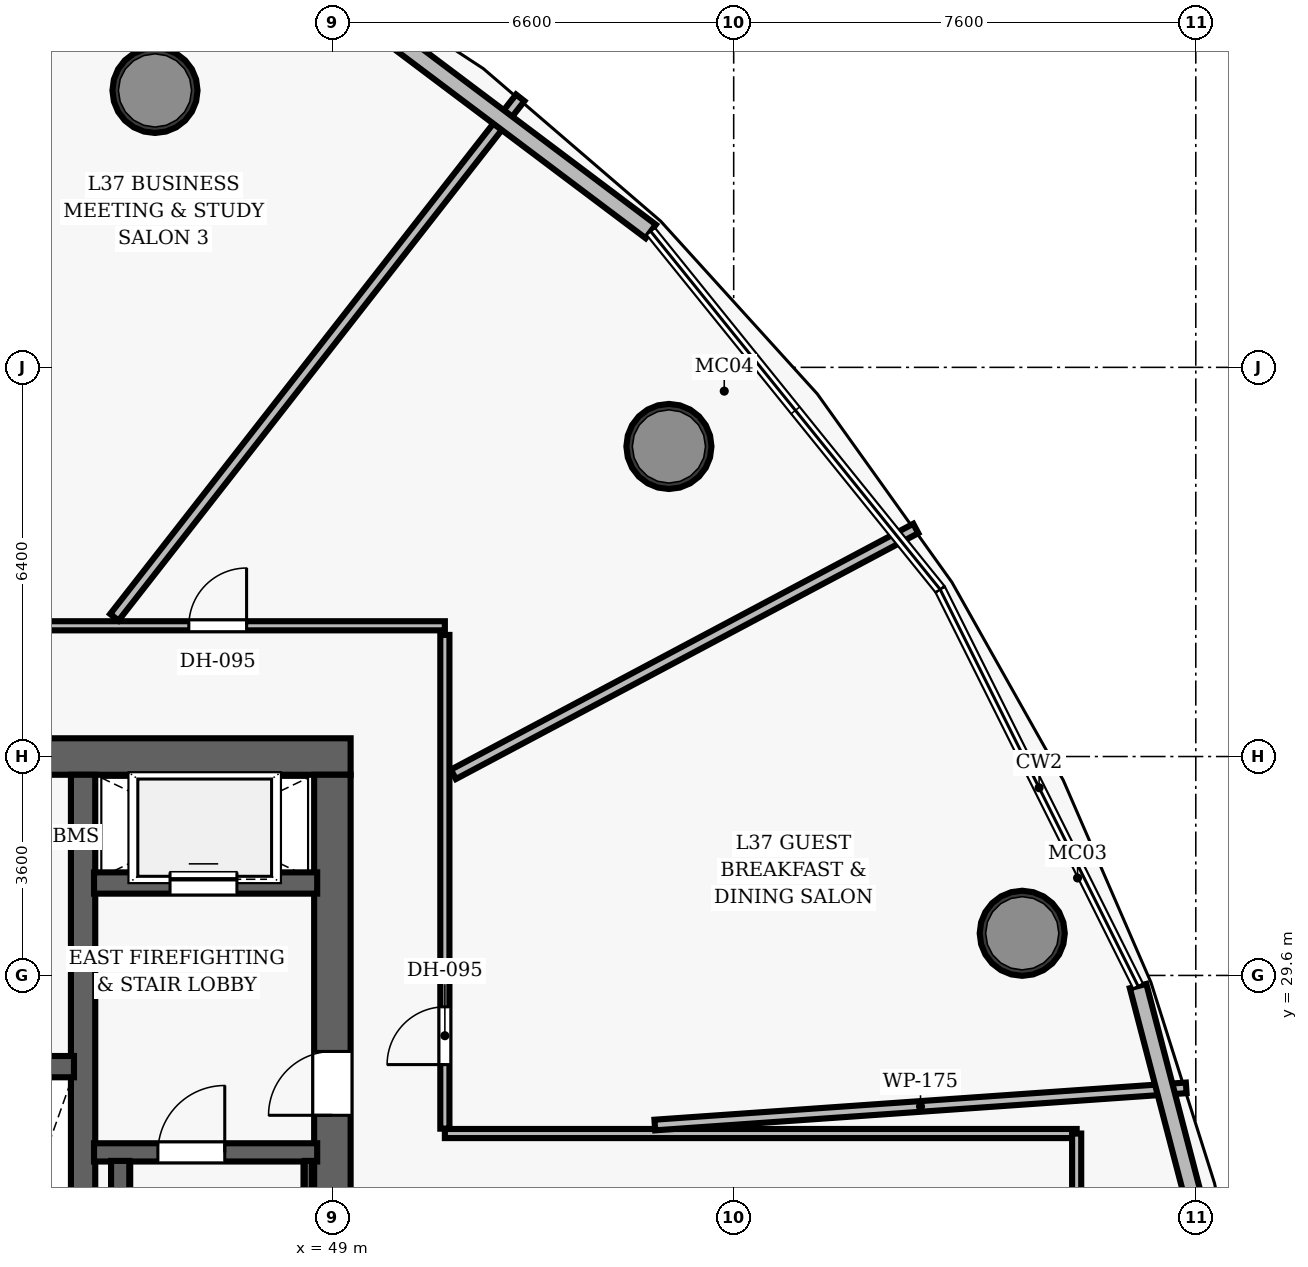
"""IFC4 building model, lengths in metres.
Left out: names, types, materials, properties, quantities, classifications, styles, units other than length and angle.
Written with IfcOpenShell. Run it as: python <this file> out.ifc"""

import sys

from ifc_helpers import new_model, si_unit, direction, frame, frame_2d, origin, origin_2d, place, context, subcontext, project, spatial, rectangle, hollow_circle, extrude, element, fill, save


model = new_model("IFC4")
c1 = context("Model", 3, precision=1e-05, world=origin(), true_north=direction((0.0, 1.0)))
c2 = subcontext(c1, "Body", "Model", "MODEL_VIEW")
j1 = project(units=[si_unit("LENGTHUNIT", "METRE"), si_unit("PLANEANGLEUNIT", "RADIAN")], contexts=[c1])
p1 = place(None, origin())
s1 = spatial("IfcSite", under=j1, at=p1, CompositionType="ELEMENT")
p2 = place(p1, origin())
s2 = spatial("IfcBuilding", under=s1, at=p2, CompositionType="ELEMENT")
p3 = place(p2, frame((0.0, 0.0, 148.3)))
s3 = spatial("IfcBuildingStorey", under=s2, at=p3, CompositionType="ELEMENT", Elevation=148.3)
p4 = place(p3, frame((26.7, 33.2, 0.0), z_axis=(0.0, 0.0, 1.0), x_axis=(1.0, 0.0, 0.0)))
e1 = element("IfcWall", 1, at=p4, inside=s3, PredefinedType="SHEAR", context=c2, shape_type="SweptSolid", body=[
    extrude(rectangle(XDim=22.6, YDim=0.6, at=frame_2d((11.3, 0.0))), origin(), (0.0, 0.0, 1.0), 3.5),
])
p5 = place(p4, frame((4.62, 0.0, 0.0)))
e2 = element("IfcOpeningElement", 2, at=p5, cuts=e1, PredefinedType="OPENING", context=c2, shape_type="SweptSolid", body=[
    extrude(rectangle(XDim=1.05, YDim=2.15, at=frame_2d((0.525, 1.075))), frame((0.0, 0.31, 0.0), z_axis=(0.0, -1.0, 0.0), x_axis=(1.0, 0.0, 0.0)), (0.0, 0.0, 1.0), 0.62),
])
p6 = place(p4, frame((14.52, 0.0, 0.0)))
e3 = element("IfcOpeningElement", 3, at=p6, cuts=e1, PredefinedType="OPENING", context=c2, shape_type="SweptSolid", body=[
    extrude(rectangle(XDim=1.05, YDim=2.15, at=frame_2d((0.525, 1.075))), frame((0.0, 0.31, 0.0), z_axis=(0.0, -1.0, 0.0), x_axis=(1.0, 0.0, 0.0)), (0.0, 0.0, 1.0), 0.62),
])
p7 = place(p3, frame((49.0, 19.1, 0.0), z_axis=(0.0, 0.0, 1.0), x_axis=(0.0, 1.0, 0.0)))
e4 = element("IfcWall", 4, at=p7, inside=s3, PredefinedType="SHEAR", context=c2, shape_type="SweptSolid", body=[
    extrude(rectangle(XDim=13.8, YDim=0.6, at=frame_2d((6.9, 0.0))), origin(), (0.0, 0.0, 1.0), 3.5),
])
p8 = place(p7, frame((8.2, 0.0, 0.0)))
e5 = element("IfcOpeningElement", 5, at=p8, cuts=e4, PredefinedType="OPENING", context=c2, shape_type="SweptSolid", body=[
    extrude(rectangle(XDim=1.05, YDim=2.15, at=frame_2d((0.525, 1.075))), frame((0.0, 0.31, 0.0), z_axis=(0.0, -1.0, 0.0), x_axis=(1.0, 0.0, 0.0)), (0.0, 0.0, 1.0), 0.62),
])
p9 = place(p3, frame((44.9, 19.1, 0.0), z_axis=(0.0, 0.0, 1.0), x_axis=(0.0, 1.0, 0.0)))
e6 = element("IfcWall", 6, at=p9, inside=s3, PredefinedType="SHEAR", context=c2, shape_type="SweptSolid", body=[
    extrude(rectangle(XDim=13.8, YDim=0.4, at=frame_2d((6.9, 0.0))), origin(), (0.0, 0.0, 1.0), 3.5),
])
for number, where, z_axis, x_axis in (
    (7, (60.346, 30.293, 0.0), (0.0, 0.0, 1.0), (1.0, 0.0, 0.0)),
    (8, (54.535, 38.299, 0.0), (0.0, 0.0, 1.0), (1.0, 0.0, 0.0)),
    (9, (46.083, 44.154, 0.0), (0.0, 0.0, 1.0), (1.0, 0.0, 0.0)),
):
    element("IfcColumn", number, at=place(p3, frame(where, z_axis=z_axis, x_axis=x_axis)), inside=s3, PredefinedType="COLUMN", context=c2, shape_type="SweptSolid", body=[
        extrude(hollow_circle(Radius=0.7, WallThickness=0.055, at=origin_2d()), origin(), (0.0, 0.0, 1.0), 3.5),
    ])
p10 = place(p3, frame((45.08, 26.69, 0.0), z_axis=(0.0, 0.0, 1.0), x_axis=(1.0, 0.0, 0.0)))
e10 = element("IfcWall", 10, at=p10, inside=s3, PredefinedType="SHEAR", context=c2, shape_type="SweptSolid", body=[
    extrude(rectangle(XDim=3.67, YDim=0.3, at=frame_2d((1.835, 0.0))), origin(), (0.0, 0.0, 1.0), 3.5),
])
p11 = place(p10, frame((1.05, 0.0, 0.0)))
e11 = element("IfcOpeningElement", 11, at=p11, cuts=e10, PredefinedType="OPENING", context=c2, shape_type="SweptSolid", body=[
    extrude(rectangle(XDim=1.1, YDim=2.15, at=frame_2d((0.55, 1.075))), frame((0.0, 0.16, 0.0), z_axis=(0.0, -1.0, 0.0), x_axis=(1.0, 0.0, 0.0)), (0.0, 0.0, 1.0), 0.32),
])
p12 = place(p3, frame((45.51, 19.05, 0.0), z_axis=(0.0, 0.0, 1.0), x_axis=(0.0, 1.0, 0.0)))
e12 = element("IfcWall", 12, at=p12, inside=s3, PredefinedType="SHEAR", context=c2, shape_type="SweptSolid", body=[
    extrude(rectangle(XDim=7.5, YDim=0.3, at=frame_2d((3.75, 0.0))), origin(), (0.0, 0.0, 1.0), 3.5),
])
p13 = place(p3, frame((48.605, 19.1, 0.0), z_axis=(0.0, 0.0, 1.0), x_axis=(0.0, 1.0, 0.0)))
e13 = element("IfcWall", 13, at=p13, inside=s3, PredefinedType="SHEAR", context=c2, shape_type="SweptSolid", body=[
    extrude(rectangle(XDim=7.45, YDim=0.12, at=frame_2d((3.725, 0.0))), origin(), (0.0, 0.0, 1.0), 3.5),
])
p14 = place(p3, frame((45.08, 31.12, 0.0), z_axis=(0.0, 0.0, 1.0), x_axis=(1.0, 0.0, 0.0)))
e14 = element("IfcWall", 14, at=p14, inside=s3, PredefinedType="SHEAR", context=c2, shape_type="SweptSolid", body=[
    extrude(rectangle(XDim=3.67, YDim=0.35, at=frame_2d((1.835, 0.0))), origin(), (0.0, 0.0, 1.0), 2.675),
])
p15 = place(p14, frame((1.25, 0.0, 0.0)))
e15 = element("IfcOpeningElement", 15, at=p15, cuts=e14, PredefinedType="OPENING", context=c2, shape_type="SweptSolid", body=[
    extrude(rectangle(XDim=1.1, YDim=2.15, at=frame_2d((0.55, 1.075))), frame((0.0, 0.185, 0.0), z_axis=(0.0, -1.0, 0.0), x_axis=(1.0, 0.0, 0.0)), (0.0, 0.0, 1.0), 0.37),
])
p16 = place(p3, frame((42.72, 28.1, 0.0), z_axis=(0.0, 0.0, 1.0), x_axis=(1.0, 0.0, 0.0)))
e16 = element("IfcWall", 16, at=p16, inside=s3, PredefinedType="SHEAR", context=c2, shape_type="SweptSolid", body=[
    extrude(rectangle(XDim=2.03, YDim=0.35, at=frame_2d((1.015, 0.0))), origin(), (0.0, 0.0, 1.0), 2.675),
])
p17 = place(p3, frame((24.85, 35.35, 0.0), z_axis=(0.0, 0.0, 1.0), x_axis=(1.0, 0.0, 0.0)))
e17 = element("IfcWall", 17, at=p17, inside=s3, PredefinedType="PARTITIONING", context=c2, shape_type="SweptSolid", body=[
    extrude(rectangle(XDim=26.0, YDim=0.15, at=frame_2d((13.0, 0.0))), origin(), (0.0, 0.0, 1.0), 2.675),
])
p18 = place(p17, frame((21.789, 0.0, 0.0)))
e18 = element("IfcOpeningElement", 18, at=p18, cuts=e17, PredefinedType="OPENING", context=c2, shape_type="SweptSolid", body=[
    extrude(rectangle(XDim=0.95, YDim=2.15, at=frame_2d((0.475, 1.075))), frame((0.0, 0.085, 0.0), z_axis=(0.0, -1.0, 0.0), x_axis=(1.0, 0.0, 0.0)), (0.0, 0.0, 1.0), 0.17),
])
p19 = place(p17, frame((16.151, 0.0, 0.0)))
e19 = element("IfcOpeningElement", 19, at=p19, cuts=e17, PredefinedType="OPENING", context=c2, shape_type="SweptSolid", body=[
    extrude(rectangle(XDim=0.95, YDim=2.15, at=frame_2d((0.475, 1.075))), frame((0.0, 0.085, 0.0), z_axis=(0.0, -1.0, 0.0), x_axis=(1.0, 0.0, 0.0)), (0.0, 0.0, 1.0), 0.17),
])
p20 = place(p17, frame((12.327, 0.0, 0.0)))
e20 = element("IfcOpeningElement", 20, at=p20, cuts=e17, PredefinedType="OPENING", context=c2, shape_type="SweptSolid", body=[
    extrude(rectangle(XDim=0.95, YDim=2.15, at=frame_2d((0.475, 1.075))), frame((0.0, 0.085, 0.0), z_axis=(0.0, -1.0, 0.0), x_axis=(1.0, 0.0, 0.0)), (0.0, 0.0, 1.0), 0.17),
])
p21 = place(p17, frame((7.312, 0.0, 0.0)))
e21 = element("IfcOpeningElement", 21, at=p21, cuts=e17, PredefinedType="OPENING", context=c2, shape_type="SweptSolid", body=[
    extrude(rectangle(XDim=0.95, YDim=2.15, at=frame_2d((0.475, 1.075))), frame((0.0, 0.085, 0.0), z_axis=(0.0, -1.0, 0.0), x_axis=(1.0, 0.0, 0.0)), (0.0, 0.0, 1.0), 0.17),
])
p22 = place(p17, frame((4.819, 0.0, 0.0)))
e22 = element("IfcOpeningElement", 22, at=p22, cuts=e17, PredefinedType="OPENING", context=c2, shape_type="SweptSolid", body=[
    extrude(rectangle(XDim=0.95, YDim=2.15, at=frame_2d((0.475, 1.075))), frame((0.0, 0.085, 0.0), z_axis=(0.0, -1.0, 0.0), x_axis=(1.0, 0.0, 0.0)), (0.0, 0.0, 1.0), 0.17),
])
p23 = place(p3, frame((50.85, 27.08, 0.0), z_axis=(0.0, 0.0, 1.0), x_axis=(0.0, 1.0, 0.0)))
e23 = element("IfcWall", 23, at=p23, inside=s3, PredefinedType="PARTITIONING", context=c2, shape_type="SweptSolid", body=[
    extrude(rectangle(XDim=8.12, YDim=0.15, at=frame_2d((4.06, 0.0))), origin(), (0.0, 0.0, 1.0), 2.675),
])
p24 = place(p23, frame((1.054, 0.0, 0.0)))
e24 = element("IfcOpeningElement", 24, at=p24, cuts=e23, PredefinedType="OPENING", context=c2, shape_type="SweptSolid", body=[
    extrude(rectangle(XDim=0.95, YDim=2.15, at=frame_2d((0.475, 1.075))), frame((0.0, 0.085, 0.0), z_axis=(0.0, -1.0, 0.0), x_axis=(1.0, 0.0, 0.0)), (0.0, 0.0, 1.0), 0.17),
])
p25 = place(p3, frame((50.85, 27.0, 0.0), z_axis=(0.0, 0.0, 1.0), x_axis=(1.0, 0.0, 0.0)))
e25 = element("IfcWall", 25, at=p25, inside=s3, PredefinedType="PARTITIONING", context=c2, shape_type="SweptSolid", body=[
    extrude(rectangle(XDim=10.391, YDim=0.15, at=frame_2d((5.195, 0.0))), origin(), (0.0, 0.0, 1.0), 2.675),
])
p26 = place(p3, frame((61.241, 25.0, 0.0), z_axis=(0.0, 0.0, 1.0), x_axis=(0.0, 1.0, 0.0)))
e26 = element("IfcWall", 26, at=p26, inside=s3, PredefinedType="PARTITIONING", context=c2, shape_type="SweptSolid", body=[
    extrude(rectangle(XDim=2.0, YDim=0.15, at=frame_2d((1.0, 0.0))), origin(), (0.0, 0.0, 1.0), 2.675),
])
p27 = place(p3, frame((54.303, 27.14, 0.0), z_axis=(0.0, 0.0, 1.0), x_axis=(0.997562576326, 0.069777548777, 0.0)))
e27 = element("IfcWall", 27, at=p27, inside=s3, PredefinedType="PARTITIONING", context=c2, shape_type="SweptSolid", body=[
    extrude(rectangle(XDim=8.761, YDim=0.175, at=frame_2d((4.38, 0.0))), origin(), (0.0, 0.0, 1.0), 2.675),
])
p28 = place(p3, frame((50.99, 32.907, 0.0), z_axis=(0.0, 0.0, 1.0), x_axis=(0.882956390808, 0.469455015877, 0.0)))
e28 = element("IfcWall", 28, at=p28, inside=s3, PredefinedType="PARTITIONING", context=c2, shape_type="SweptSolid", body=[
    extrude(rectangle(XDim=8.613, YDim=0.175, at=frame_2d((4.307, 0.0))), origin(), (0.0, 0.0, 1.0), 2.675),
])
p29 = place(p3, frame((45.414, 35.49, 0.0), z_axis=(0.0, 0.0, 1.0), x_axis=(0.615657151534, 0.788014131704, 0.0)))
e29 = element("IfcWall", 29, at=p29, inside=s3, PredefinedType="PARTITIONING", context=c2, shape_type="SweptSolid", body=[
    extrude(rectangle(XDim=10.842, YDim=0.175, at=frame_2d((5.421, 0.0))), origin(), (0.0, 0.0, 1.0), 2.675),
])
p30 = place(p3, frame((62.251, 29.425, 0.0), z_axis=(0.0, 0.0, 1.0), x_axis=(0.252709673809, -0.967542154515, 0.0)))
e30 = element("IfcWall", 30, at=p30, inside=s3, PredefinedType="SOLIDWALL", context=c2, shape_type="SweptSolid", body=[
    extrude(rectangle(XDim=6.665, YDim=0.28, at=frame_2d((3.333, 0.0))), origin(), (0.0, 0.0, 1.0), 3.26),
])
p31 = place(p3, frame((48.148, 46.415, 0.0), z_axis=(0.0, 0.0, 1.0), x_axis=(0.799187740933, -0.601081487606, 0.0)))
e31 = element("IfcWall", 31, at=p31, inside=s3, PredefinedType="SOLIDWALL", context=c2, shape_type="SweptSolid", body=[
    extrude(rectangle(XDim=7.617, YDim=0.28, at=frame_2d((3.809, 0.0))), origin(), (0.0, 0.0, 1.0), 3.26),
])
p32 = place(p11, origin())
e32 = element("IfcDoor", 32, at=p32, inside=s3, OperationType="SINGLE_SWING_RIGHT", PredefinedType="DOOR", context=c2, shape_type="SweptSolid", body=[
    extrude(rectangle(XDim=1.1, YDim=2.15, at=frame_2d((0.55, 1.075))), frame((0.0, 0.025, 0.0), z_axis=(0.0, -1.0, 0.0), x_axis=(1.0, 0.0, 0.0)), (0.0, 0.0, 1.0), 0.05),
])
fill(e11, e32)
p33 = place(p8, origin())
e33 = element("IfcDoor", 33, at=p33, inside=s3, OperationType="SINGLE_SWING_LEFT", PredefinedType="DOOR", context=c2, shape_type="SweptSolid", body=[
    extrude(rectangle(XDim=1.05, YDim=2.15, at=frame_2d((0.525, 1.075))), frame((0.0, 0.025, 0.0), z_axis=(0.0, -1.0, 0.0), x_axis=(1.0, 0.0, 0.0)), (0.0, 0.0, 1.0), 0.05),
])
fill(e5, e33)
p34 = place(p24, origin())
e34 = element("IfcDoor", 34, at=p34, inside=s3, OperationType="SINGLE_SWING_LEFT", PredefinedType="DOOR", context=c2, shape_type="SweptSolid", body=[
    extrude(rectangle(XDim=0.95, YDim=2.15, at=frame_2d((0.475, 1.075))), frame((0.0, 0.025, 0.0), z_axis=(0.0, -1.0, 0.0), x_axis=(1.0, 0.0, 0.0)), (0.0, 0.0, 1.0), 0.05),
])
fill(e24, e34)
p35 = place(p18, origin())
e35 = element("IfcDoor", 35, at=p35, inside=s3, OperationType="SINGLE_SWING_RIGHT", PredefinedType="DOOR", context=c2, shape_type="SweptSolid", body=[
    extrude(rectangle(XDim=0.95, YDim=2.15, at=frame_2d((0.475, 1.075))), frame((0.0, 0.025, 0.0), z_axis=(0.0, -1.0, 0.0), x_axis=(1.0, 0.0, 0.0)), (0.0, 0.0, 1.0), 0.05),
])
fill(e18, e35)
p36 = place(p15, origin())
e36 = element("IfcDoor", 36, at=p36, inside=s3, OperationType="SLIDING_TO_LEFT", PredefinedType="DOOR", context=c2, shape_type="SweptSolid", body=[
    extrude(rectangle(XDim=1.1, YDim=2.15, at=frame_2d((0.55, 1.075))), frame((0.0, 0.025, 0.0), z_axis=(0.0, -1.0, 0.0), x_axis=(1.0, 0.0, 0.0)), (0.0, 0.0, 1.0), 0.05),
])
fill(e15, e36)
save(model, sys.argv[1])
